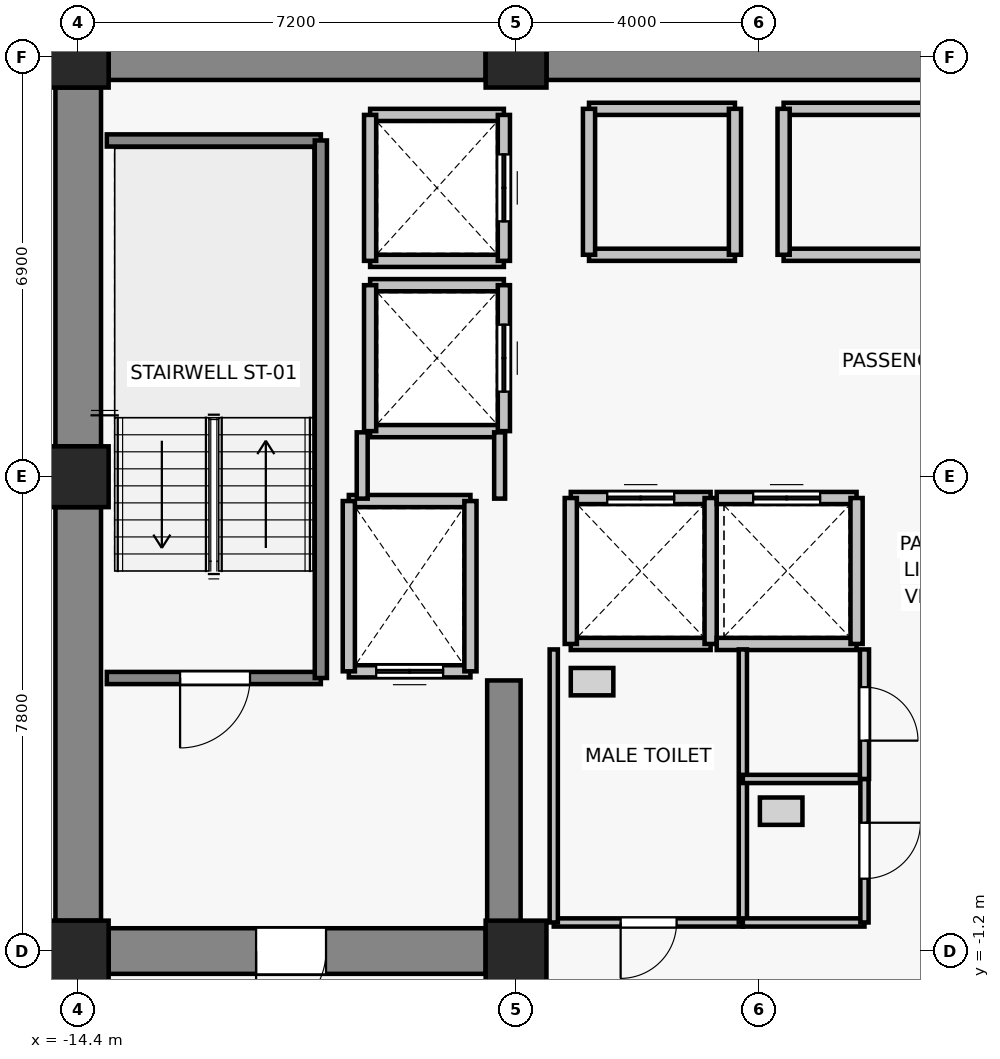
"""IFC4 building model, lengths in metres.
Left out: names, types, materials, properties, quantities, classifications, styles, units other than length and angle.
Written with IfcOpenShell. Run it as: python <this file> out.ifc"""

import sys

from ifc_helpers import new_model, si_unit, direction, frame, frame_2d, origin, origin_2d, place, context, subcontext, project, spatial, rectangle, extrude, source, transform, mapped, element, fill, save


model = new_model("IFC4")
c1 = context("Model", 3, precision=1e-05, world=origin(), true_north=direction((0.0, 1.0)))
c2 = subcontext(c1, "Body", "Model", "MODEL_VIEW")
j1 = project(units=[si_unit("LENGTHUNIT", "METRE"), si_unit("PLANEANGLEUNIT", "RADIAN")], contexts=[c1])
p1 = place(None, origin())
s1 = spatial("IfcSite", under=j1, at=p1, CompositionType="ELEMENT")
p2 = place(p1, origin())
s2 = spatial("IfcBuilding", under=s1, at=p2, CompositionType="ELEMENT")
p3 = place(p2, frame((0.0, 0.0, 86.8)))
s3 = spatial("IfcBuildingStorey", under=s2, at=p3, CompositionType="ELEMENT", Elevation=86.8)
for number, where, z_axis, x_axis in (
    (1, (-14.4, -1.2, 0.0), (0.0, 0.0, 1.0), (1.0, 0.0, 0.0)),
    (2, (-7.2, -1.2, 0.0), (0.0, 0.0, 1.0), (1.0, 0.0, 0.0)),
    (3, (-14.4, 6.6, 0.0), (0.0, 0.0, 1.0), (1.0, 0.0, 0.0)),
    (4, (-14.4, 13.5, 0.0), (0.0, 0.0, 1.0), (1.0, 0.0, 0.0)),
    (5, (-7.2, 13.5, 0.0), (0.0, 0.0, 1.0), (1.0, 0.0, 0.0)),
):
    element("IfcColumn", number, at=place(p3, frame(where, z_axis=z_axis, x_axis=x_axis)), inside=s3, PredefinedType="COLUMN", context=c2, shape_type="SweptSolid", body=[
        extrude(rectangle(XDim=1.0, YDim=1.0, at=origin_2d()), origin(), (0.0, 0.0, 1.0), 3.3),
    ])
p4 = place(p3, frame((-13.9, 13.5, 0.0), z_axis=(0.0, 0.0, 1.0), x_axis=(1.0, 0.0, 0.0)))
e6 = element("IfcWall", 6, at=p4, inside=s3, PredefinedType="SHEAR", context=c2, shape_type="SweptSolid", body=[
    extrude(rectangle(XDim=6.2, YDim=0.75, at=frame_2d((3.1, 0.0))), origin(), (0.0, 0.0, 1.0), 3.075),
])
p5 = place(p3, frame((-6.7, 13.5, 0.0), z_axis=(0.0, 0.0, 1.0), x_axis=(1.0, 0.0, 0.0)))
e7 = element("IfcWall", 7, at=p5, inside=s3, PredefinedType="SHEAR", context=c2, shape_type="SweptSolid", body=[
    extrude(rectangle(XDim=13.4, YDim=0.75, at=frame_2d((6.7, 0.0))), origin(), (0.0, 0.0, 1.0), 3.075),
])
p6 = place(p3, frame((-14.4, -0.7, 0.0), z_axis=(0.0, 0.0, 1.0), x_axis=(0.0, 1.0, 0.0)))
e8 = element("IfcWall", 8, at=p6, inside=s3, PredefinedType="SHEAR", context=c2, shape_type="SweptSolid", body=[
    extrude(rectangle(XDim=6.8, YDim=0.75, at=frame_2d((3.4, 0.0))), origin(), (0.0, 0.0, 1.0), 3.075),
])
p7 = place(p3, frame((-14.4, 7.1, 0.0), z_axis=(0.0, 0.0, 1.0), x_axis=(0.0, 1.0, 0.0)))
e9 = element("IfcWall", 9, at=p7, inside=s3, PredefinedType="SHEAR", context=c2, shape_type="SweptSolid", body=[
    extrude(rectangle(XDim=5.9, YDim=0.75, at=frame_2d((2.95, 0.0))), origin(), (0.0, 0.0, 1.0), 3.075),
])
p8 = place(p3, frame((-7.7, -1.2, 0.0), z_axis=(0.0, 0.0, 1.0), x_axis=(-1.0, 0.0, 0.0)))
e10 = element("IfcWall", 10, at=p8, inside=s3, PredefinedType="SHEAR", context=c2, shape_type="SweptSolid", body=[
    extrude(rectangle(XDim=6.2, YDim=0.75, at=frame_2d((3.1, 0.0))), origin(), (0.0, 0.0, 1.0), 3.075),
])
p9 = place(p8, frame((2.625, 0.0, 0.0)))
e11 = element("IfcOpeningElement", 11, at=p9, cuts=e10, PredefinedType="OPENING", context=c2, shape_type="SweptSolid", body=[
    extrude(rectangle(XDim=1.15, YDim=2.15, at=frame_2d((0.575, 1.075))), frame((0.0, 0.385, 0.0), z_axis=(0.0, -1.0, 0.0), x_axis=(1.0, 0.0, 0.0)), (0.0, 0.0, 1.0), 0.77),
])
p10 = place(p3, frame((-7.4, -0.825, 0.0), z_axis=(0.0, 0.0, 1.0), x_axis=(0.0, 1.0, 0.0)))
e12 = element("IfcWall", 12, at=p10, inside=s3, PredefinedType="SHEAR", context=c2, shape_type="SweptSolid", body=[
    extrude(rectangle(XDim=4.075, YDim=0.55, at=frame_2d((2.038, 0.0))), origin(), (0.0, 0.0, 1.0), 3.075),
])
p11 = place(p3, frame((-7.95, 3.4, 0.0), z_axis=(0.0, 0.0, 1.0), x_axis=(-1.0, 0.0, 0.0)))
e13 = element("IfcWall", 13, at=p11, inside=s3, PredefinedType="SOLIDWALL", context=c2, shape_type="SweptSolid", body=[
    extrude(rectangle(XDim=2.0, YDim=0.2, at=frame_2d((1.0, 0.0))), origin(), (0.0, 0.0, 1.0), 3.075),
])
p12 = place(p11, frame((0.45, 0.0, 0.0)))
e14 = element("IfcOpeningElement", 14, at=p12, cuts=e13, PredefinedType="OPENING", context=c2, shape_type="SweptSolid", body=[
    extrude(rectangle(XDim=1.1, YDim=2.2, at=frame_2d((0.55, 1.1))), frame((0.0, 0.11, 0.0), z_axis=(0.0, -1.0, 0.0), x_axis=(1.0, 0.0, 0.0)), (0.0, 0.0, 1.0), 0.22),
])
p13 = place(p3, frame((-9.95, 6.2, 0.0), z_axis=(0.0, 0.0, 1.0), x_axis=(1.0, 0.0, 0.0)))
e15 = element("IfcWall", 15, at=p13, inside=s3, PredefinedType="SOLIDWALL", context=c2, shape_type="SweptSolid", body=[
    extrude(rectangle(XDim=2.0, YDim=0.2, at=frame_2d((1.0, 0.0))), origin(), (0.0, 0.0, 1.0), 3.075),
])
for number, where, z_axis, x_axis in (
    (16, (-9.95, 3.4, 0.0), (0.0, 0.0, 1.0), (0.0, 1.0, 0.0)),
    (17, (-7.95, 6.2, 0.0), (0.0, 0.0, 1.0), (0.0, -1.0, 0.0)),
):
    element("IfcWall", number, at=place(p3, frame(where, z_axis=z_axis, x_axis=x_axis)), inside=s3, PredefinedType="SOLIDWALL", context=c2, shape_type="SweptSolid", body=[
        extrude(rectangle(XDim=2.8, YDim=0.2, at=frame_2d((1.4, 0.0))), origin(), (0.0, 0.0, 1.0), 3.075),
    ])
for number, where, z_axis, x_axis in (
    (18, (-3.6, 10.25, 0.0), (0.0, 0.0, 1.0), (-1.0, 0.0, 0.0)),
    (19, (-6.0, 12.65, 0.0), (0.0, 0.0, 1.0), (1.0, 0.0, 0.0)),
):
    element("IfcWall", number, at=place(p3, frame(where, z_axis=z_axis, x_axis=x_axis)), inside=s3, PredefinedType="SOLIDWALL", context=c2, shape_type="SweptSolid", body=[
        extrude(rectangle(XDim=2.4, YDim=0.2, at=frame_2d((1.2, 0.0))), origin(), (0.0, 0.0, 1.0), 2.59),
    ])
for number, where, z_axis, x_axis in (
    (20, (-6.0, 10.25, 0.0), (0.0, 0.0, 1.0), (0.0, 1.0, 0.0)),
    (21, (-3.6, 12.65, 0.0), (0.0, 0.0, 1.0), (0.0, -1.0, 0.0)),
):
    element("IfcWall", number, at=place(p3, frame(where, z_axis=z_axis, x_axis=x_axis)), inside=s3, PredefinedType="SOLIDWALL", context=c2, shape_type="SweptSolid", body=[
        extrude(rectangle(XDim=2.4, YDim=0.2, at=frame_2d((1.2, 0.0))), origin(), (0.0, 0.0, 1.0), 3.075),
    ])
for number, where, z_axis, x_axis in (
    (22, (-0.4, 10.25, 0.0), (0.0, 0.0, 1.0), (-1.0, 0.0, 0.0)),
    (23, (-2.8, 12.65, 0.0), (0.0, 0.0, 1.0), (1.0, 0.0, 0.0)),
):
    element("IfcWall", number, at=place(p3, frame(where, z_axis=z_axis, x_axis=x_axis)), inside=s3, PredefinedType="SOLIDWALL", context=c2, shape_type="SweptSolid", body=[
        extrude(rectangle(XDim=2.4, YDim=0.2, at=frame_2d((1.2, 0.0))), origin(), (0.0, 0.0, 1.0), 3.075),
    ])
p14 = place(p3, frame((-2.8, 10.25, 0.0), z_axis=(0.0, 0.0, 1.0), x_axis=(0.0, 1.0, 0.0)))
e24 = element("IfcWall", 24, at=p14, inside=s3, PredefinedType="SOLIDWALL", context=c2, shape_type="SweptSolid", body=[
    extrude(rectangle(XDim=2.4, YDim=0.2, at=frame_2d((1.2, 0.0))), origin(), (0.0, 0.0, 1.0), 3.075),
])
p15 = place(p3, frame((-4.0, 3.85, 0.0), z_axis=(0.0, 0.0, 1.0), x_axis=(-1.0, 0.0, 0.0)))
e25 = element("IfcWall", 25, at=p15, inside=s3, PredefinedType="SOLIDWALL", context=c2, shape_type="SweptSolid", body=[
    extrude(rectangle(XDim=2.3, YDim=0.2, at=frame_2d((1.15, 0.0))), origin(), (0.0, 0.0, 1.0), 3.075),
])
p16 = place(p3, frame((-6.3, 6.25, 0.0), z_axis=(0.0, 0.0, 1.0), x_axis=(1.0, 0.0, 0.0)))
e26 = element("IfcWall", 26, at=p16, inside=s3, PredefinedType="SOLIDWALL", context=c2, shape_type="SweptSolid", body=[
    extrude(rectangle(XDim=2.3, YDim=0.2, at=frame_2d((1.15, 0.0))), origin(), (0.0, 0.0, 1.0), 3.075),
])
p17 = place(p16, frame((0.6, 0.0, 0.0)))
e27 = element("IfcOpeningElement", 27, at=p17, cuts=e26, PredefinedType="OPENING", context=c2, shape_type="SweptSolid", body=[
    extrude(rectangle(XDim=1.1, YDim=2.2, at=frame_2d((0.55, 1.1))), frame((0.0, 0.11, 0.0), z_axis=(0.0, -1.0, 0.0), x_axis=(1.0, 0.0, 0.0)), (0.0, 0.0, 1.0), 0.22),
])
for number, where, z_axis, x_axis in (
    (28, (-6.3, 3.85, 0.0), (0.0, 0.0, 1.0), (0.0, 1.0, 0.0)),
    (29, (-4.0, 6.25, 0.0), (0.0, 0.0, 1.0), (0.0, -1.0, 0.0)),
):
    element("IfcWall", number, at=place(p3, frame(where, z_axis=z_axis, x_axis=x_axis)), inside=s3, PredefinedType="SOLIDWALL", context=c2, shape_type="SweptSolid", body=[
        extrude(rectangle(XDim=2.4, YDim=0.2, at=frame_2d((1.2, 0.0))), origin(), (0.0, 0.0, 1.0), 3.075),
    ])
p18 = place(p3, frame((-1.6, 3.85, 0.0), z_axis=(0.0, 0.0, 1.0), x_axis=(-1.0, 0.0, 0.0)))
e30 = element("IfcWall", 30, at=p18, inside=s3, PredefinedType="SOLIDWALL", context=c2, shape_type="SweptSolid", body=[
    extrude(rectangle(XDim=2.3, YDim=0.2, at=frame_2d((1.15, 0.0))), origin(), (0.0, 0.0, 1.0), 3.075),
])
p19 = place(p3, frame((-3.9, 6.25, 0.0), z_axis=(0.0, 0.0, 1.0), x_axis=(1.0, 0.0, 0.0)))
e31 = element("IfcWall", 31, at=p19, inside=s3, PredefinedType="SOLIDWALL", context=c2, shape_type="SweptSolid", body=[
    extrude(rectangle(XDim=2.3, YDim=0.2, at=frame_2d((1.15, 0.0))), origin(), (0.0, 0.0, 1.0), 3.075),
])
p20 = place(p19, frame((0.6, 0.0, 0.0)))
e32 = element("IfcOpeningElement", 32, at=p20, cuts=e31, PredefinedType="OPENING", context=c2, shape_type="SweptSolid", body=[
    extrude(rectangle(XDim=1.1, YDim=2.2, at=frame_2d((0.55, 1.1))), frame((0.0, 0.11, 0.0), z_axis=(0.0, -1.0, 0.0), x_axis=(1.0, 0.0, 0.0)), (0.0, 0.0, 1.0), 0.22),
])
p21 = place(p3, frame((-1.6, 6.25, 0.0), z_axis=(0.0, 0.0, 1.0), x_axis=(0.0, -1.0, 0.0)))
e33 = element("IfcWall", 33, at=p21, inside=s3, PredefinedType="SOLIDWALL", context=c2, shape_type="SweptSolid", body=[
    extrude(rectangle(XDim=2.4, YDim=0.2, at=frame_2d((1.2, 0.0))), origin(), (0.0, 0.0, 1.0), 3.075),
])
for number, where, z_axis, x_axis in (
    (34, (-7.4, 7.35, 0.0), (0.0, 0.0, 1.0), (-1.0, 0.0, 0.0)),
    (35, (-9.6, 9.75, 0.0), (0.0, 0.0, 1.0), (1.0, 0.0, 0.0)),
):
    element("IfcWall", number, at=place(p3, frame(where, z_axis=z_axis, x_axis=x_axis)), inside=s3, PredefinedType="SOLIDWALL", context=c2, shape_type="SweptSolid", body=[
        extrude(rectangle(XDim=2.2, YDim=0.2, at=frame_2d((1.1, 0.0))), origin(), (0.0, 0.0, 1.0), 2.515),
    ])
p22 = place(p3, frame((-9.6, 7.35, 0.0), z_axis=(0.0, 0.0, 1.0), x_axis=(0.0, 1.0, 0.0)))
e36 = element("IfcWall", 36, at=p22, inside=s3, PredefinedType="SOLIDWALL", context=c2, shape_type="SweptSolid", body=[
    extrude(rectangle(XDim=2.4, YDim=0.2, at=frame_2d((1.2, 0.0))), origin(), (0.0, 0.0, 1.0), 3.075),
])
p23 = place(p3, frame((-7.4, 9.75, 0.0), z_axis=(0.0, 0.0, 1.0), x_axis=(0.0, -1.0, 0.0)))
e37 = element("IfcWall", 37, at=p23, inside=s3, PredefinedType="SOLIDWALL", context=c2, shape_type="SweptSolid", body=[
    extrude(rectangle(XDim=2.4, YDim=0.2, at=frame_2d((1.2, 0.0))), origin(), (0.0, 0.0, 1.0), 2.515),
])
p24 = place(p23, frame((0.65, 0.0, 0.0)))
e38 = element("IfcOpeningElement", 38, at=p24, cuts=e37, PredefinedType="OPENING", context=c2, shape_type="SweptSolid", body=[
    extrude(rectangle(XDim=1.1, YDim=2.2, at=frame_2d((0.55, 1.1))), frame((0.0, 0.11, 0.0), z_axis=(0.0, -1.0, 0.0), x_axis=(1.0, 0.0, 0.0)), (0.0, 0.0, 1.0), 0.22),
])
for number, where, z_axis, x_axis in (
    (39, (-7.4, 10.15, 0.0), (0.0, 0.0, 1.0), (-1.0, 0.0, 0.0)),
    (40, (-9.6, 12.55, 0.0), (0.0, 0.0, 1.0), (1.0, 0.0, 0.0)),
):
    element("IfcWall", number, at=place(p3, frame(where, z_axis=z_axis, x_axis=x_axis)), inside=s3, PredefinedType="SOLIDWALL", context=c2, shape_type="SweptSolid", body=[
        extrude(rectangle(XDim=2.2, YDim=0.2, at=frame_2d((1.1, 0.0))), origin(), (0.0, 0.0, 1.0), 2.515),
    ])
p25 = place(p3, frame((-9.6, 10.15, 0.0), z_axis=(0.0, 0.0, 1.0), x_axis=(0.0, 1.0, 0.0)))
e41 = element("IfcWall", 41, at=p25, inside=s3, PredefinedType="SOLIDWALL", context=c2, shape_type="SweptSolid", body=[
    extrude(rectangle(XDim=2.4, YDim=0.2, at=frame_2d((1.2, 0.0))), origin(), (0.0, 0.0, 1.0), 3.075),
])
p26 = place(p3, frame((-7.4, 12.55, 0.0), z_axis=(0.0, 0.0, 1.0), x_axis=(0.0, -1.0, 0.0)))
e42 = element("IfcWall", 42, at=p26, inside=s3, PredefinedType="SOLIDWALL", context=c2, shape_type="SweptSolid", body=[
    extrude(rectangle(XDim=2.4, YDim=0.2, at=frame_2d((1.2, 0.0))), origin(), (0.0, 0.0, 1.0), 2.515),
])
p27 = place(p26, frame((0.65, 0.0, 0.0)))
e43 = element("IfcOpeningElement", 43, at=p27, cuts=e42, PredefinedType="OPENING", context=c2, shape_type="SweptSolid", body=[
    extrude(rectangle(XDim=1.1, YDim=2.2, at=frame_2d((0.55, 1.1))), frame((0.0, 0.11, 0.0), z_axis=(0.0, -1.0, 0.0), x_axis=(1.0, 0.0, 0.0)), (0.0, 0.0, 1.0), 0.22),
])
p28 = place(p3, frame((-10.41, 3.29, 0.0), z_axis=(0.0, 0.0, 1.0), x_axis=(-1.0, 0.0, 0.0)))
e44 = element("IfcWall", 44, at=p28, inside=s3, PredefinedType="SOLIDWALL", context=c2, shape_type="SweptSolid", body=[
    extrude(rectangle(XDim=3.52, YDim=0.2, at=frame_2d((1.76, 0.0))), origin(), (0.0, 0.0, 1.0), 3.075),
])
p29 = place(p28, frame((1.165, 0.0, 0.0)))
e45 = element("IfcOpeningElement", 45, at=p29, cuts=e44, PredefinedType="OPENING", context=c2, shape_type="SweptSolid", body=[
    extrude(rectangle(XDim=1.15, YDim=2.15, at=frame_2d((0.575, 1.075))), frame((0.0, 0.11, 0.0), z_axis=(0.0, -1.0, 0.0), x_axis=(1.0, 0.0, 0.0)), (0.0, 0.0, 1.0), 0.22),
])
p30 = place(p3, frame((-13.93, 12.13, 0.0), z_axis=(0.0, 0.0, 1.0), x_axis=(1.0, 0.0, 0.0)))
e46 = element("IfcWall", 46, at=p30, inside=s3, PredefinedType="SOLIDWALL", context=c2, shape_type="SweptSolid", body=[
    extrude(rectangle(XDim=3.52, YDim=0.2, at=frame_2d((1.76, 0.0))), origin(), (0.0, 0.0, 1.0), 3.075),
])
p31 = place(p3, frame((-10.41, 12.13, 0.0), z_axis=(0.0, 0.0, 1.0), x_axis=(0.0, -1.0, 0.0)))
e47 = element("IfcWall", 47, at=p31, inside=s3, PredefinedType="SOLIDWALL", context=c2, shape_type="SweptSolid", body=[
    extrude(rectangle(XDim=8.84, YDim=0.2, at=frame_2d((4.42, 0.0))), origin(), (0.0, 0.0, 1.0), 3.075),
])
p32 = place(p3, frame((-9.73, 6.24, 0.0), z_axis=(0.0, 0.0, 1.0), x_axis=(0.0, 1.0, 0.0)))
e48 = element("IfcWall", 48, at=p32, inside=s3, PredefinedType="PARTITIONING", context=c2, shape_type="SweptSolid", body=[
    extrude(rectangle(XDim=1.09, YDim=0.18, at=frame_2d((0.545, 0.0))), origin(), (0.0, 0.0, 1.0), 3.075),
])
p33 = place(p3, frame((-7.47, 7.33, 0.0), z_axis=(0.0, 0.0, 1.0), x_axis=(0.0, -1.0, 0.0)))
e49 = element("IfcWall", 49, at=p33, inside=s3, PredefinedType="PARTITIONING", context=c2, shape_type="SweptSolid", body=[
    extrude(rectangle(XDim=1.09, YDim=0.18, at=frame_2d((0.545, 0.0))), origin(), (0.0, 0.0, 1.0), 2.515),
])
p34 = place(p3, frame((-3.47, -0.73, 0.0), z_axis=(0.0, 0.0, 1.0), x_axis=(-1.0, 0.0, 0.0)))
e50 = element("IfcWall", 50, at=p34, inside=s3, PredefinedType="PARTITIONING", context=c2, shape_type="SweptSolid", body=[
    extrude(rectangle(XDim=3.11, YDim=0.135, at=frame_2d((1.555, 0.0))), origin(), (0.0, 0.0, 1.0), 3.075),
])
p35 = place(p34, frame((1.09, 0.0, 0.0)))
e51 = element("IfcOpeningElement", 51, at=p35, cuts=e50, PredefinedType="OPENING", context=c2, shape_type="SweptSolid", body=[
    extrude(rectangle(XDim=0.92, YDim=2.1, at=frame_2d((0.46, 1.05))), frame((0.0, 0.077, 0.0), z_axis=(0.0, -1.0, 0.0), x_axis=(1.0, 0.0, 0.0)), (0.0, 0.0, 1.0), 0.155),
])
for number, where, z_axis, x_axis in (
    (52, (-6.58, -0.73, 0.0), (0.0, 0.0, 1.0), (0.0, 1.0, 0.0)),
    (53, (-3.47, 3.76, 0.0), (0.0, 0.0, 1.0), (0.0, -1.0, 0.0)),
):
    element("IfcWall", number, at=place(p3, frame(where, z_axis=z_axis, x_axis=x_axis)), inside=s3, PredefinedType="PARTITIONING", context=c2, shape_type="SweptSolid", body=[
        extrude(rectangle(XDim=4.49, YDim=0.135, at=frame_2d((2.245, 0.0))), origin(), (0.0, 0.0, 1.0), 3.075),
    ])
for number, where, z_axis, x_axis in (
    (54, (-1.47, -0.73, 0.0), (0.0, 0.0, 1.0), (-1.0, 0.0, 0.0)),
    (55, (-3.47, 1.63, 0.0), (0.0, 0.0, 1.0), (1.0, 0.0, 0.0)),
):
    element("IfcWall", number, at=place(p3, frame(where, z_axis=z_axis, x_axis=x_axis)), inside=s3, PredefinedType="PARTITIONING", context=c2, shape_type="SweptSolid", body=[
        extrude(rectangle(XDim=2.0, YDim=0.135, at=frame_2d((1.0, 0.0))), origin(), (0.0, 0.0, 1.0), 3.075),
    ])
p36 = place(p3, frame((-1.47, 1.63, 0.0), z_axis=(0.0, 0.0, 1.0), x_axis=(0.0, -1.0, 0.0)))
e56 = element("IfcWall", 56, at=p36, inside=s3, PredefinedType="PARTITIONING", context=c2, shape_type="SweptSolid", body=[
    extrude(rectangle(XDim=2.36, YDim=0.135, at=frame_2d((1.18, 0.0))), origin(), (0.0, 0.0, 1.0), 3.075),
])
p37 = place(p36, frame((0.72, 0.0, 0.0)))
e57 = element("IfcOpeningElement", 57, at=p37, cuts=e56, PredefinedType="OPENING", context=c2, shape_type="SweptSolid", body=[
    extrude(rectangle(XDim=0.92, YDim=2.1, at=frame_2d((0.46, 1.05))), frame((0.0, 0.077, 0.0), z_axis=(0.0, -1.0, 0.0), x_axis=(1.0, 0.0, 0.0)), (0.0, 0.0, 1.0), 0.155),
])
p38 = place(p3, frame((-1.47, 3.76, 0.0), z_axis=(0.0, 0.0, 1.0), x_axis=(0.0, -1.0, 0.0)))
e58 = element("IfcWall", 58, at=p38, inside=s3, PredefinedType="PARTITIONING", context=c2, shape_type="SweptSolid", body=[
    extrude(rectangle(XDim=2.13, YDim=0.15, at=frame_2d((1.065, 0.0))), origin(), (0.0, 0.0, 1.0), 3.075),
])
p39 = place(p38, frame((0.62, 0.0, 0.0)))
e59 = element("IfcOpeningElement", 59, at=p39, cuts=e58, PredefinedType="OPENING", context=c2, shape_type="SweptSolid", body=[
    extrude(rectangle(XDim=0.88, YDim=2.1, at=frame_2d((0.44, 1.05))), frame((0.0, 0.085, 0.0), z_axis=(0.0, -1.0, 0.0), x_axis=(1.0, 0.0, 0.0)), (0.0, 0.0, 1.0), 0.17),
])
m1 = source(origin(), c2, "Body", "SweptSolid", [
    extrude(rectangle(XDim=1.1, YDim=2.2, at=frame_2d((0.55, 1.1))), frame((0.0, 0.025, 0.0), z_axis=(0.0, -1.0, 0.0), x_axis=(1.0, 0.0, 0.0)), (0.0, 0.0, 1.0), 0.05),
])
p40 = place(p12, origin())
e60 = element("IfcDoor", 60, at=p40, inside=s3, OperationType="DOUBLE_DOOR_SLIDING", PredefinedType="DOOR", context=c2, shape_type="MappedRepresentation", body=[
    mapped(m1, transform((0.0, 0.0, 0.0), x_axis=(1.0, 0.0, 0.0), y_axis=(0.0, 1.0, 0.0), z_axis=(0.0, 0.0, 1.0), scale=1.0)),
])
fill(e14, e60)
p41 = place(p17, origin())
e61 = element("IfcDoor", 61, at=p41, inside=s3, OperationType="DOUBLE_DOOR_SLIDING", PredefinedType="DOOR", context=c2, shape_type="MappedRepresentation", body=[
    mapped(m1, transform((0.0, 0.0, 0.0), x_axis=(1.0, 0.0, 0.0), y_axis=(0.0, 1.0, 0.0), z_axis=(0.0, 0.0, 1.0), scale=1.0)),
])
fill(e27, e61)
p42 = place(p20, origin())
e62 = element("IfcDoor", 62, at=p42, inside=s3, OperationType="DOUBLE_DOOR_SLIDING", PredefinedType="DOOR", context=c2, shape_type="MappedRepresentation", body=[
    mapped(m1, transform((0.0, 0.0, 0.0), x_axis=(1.0, 0.0, 0.0), y_axis=(0.0, 1.0, 0.0), z_axis=(0.0, 0.0, 1.0), scale=1.0)),
])
fill(e32, e62)
p43 = place(p24, origin())
e63 = element("IfcDoor", 63, at=p43, inside=s3, OperationType="DOUBLE_DOOR_SLIDING", PredefinedType="DOOR", context=c2, shape_type="MappedRepresentation", body=[
    mapped(m1, transform((0.0, 0.0, 0.0), x_axis=(1.0, 0.0, 0.0), y_axis=(0.0, 1.0, 0.0), z_axis=(0.0, 0.0, 1.0), scale=1.0)),
])
fill(e38, e63)
p44 = place(p27, origin())
e64 = element("IfcDoor", 64, at=p44, inside=s3, OperationType="DOUBLE_DOOR_SLIDING", PredefinedType="DOOR", context=c2, shape_type="MappedRepresentation", body=[
    mapped(m1, transform((0.0, 0.0, 0.0), x_axis=(1.0, 0.0, 0.0), y_axis=(0.0, 1.0, 0.0), z_axis=(0.0, 0.0, 1.0), scale=1.0)),
])
fill(e43, e64)
m2 = source(origin(), c2, "Body", "SweptSolid", [
    extrude(rectangle(XDim=1.15, YDim=2.15, at=frame_2d((0.575, 1.075))), frame((0.0, 0.025, 0.0), z_axis=(0.0, -1.0, 0.0), x_axis=(1.0, 0.0, 0.0)), (0.0, 0.0, 1.0), 0.05),
])
p45 = place(p29, origin())
e65 = element("IfcDoor", 65, at=p45, inside=s3, OperationType="SINGLE_SWING_RIGHT", PredefinedType="DOOR", context=c2, shape_type="MappedRepresentation", body=[
    mapped(m2, transform((0.0, 0.0, 0.0), x_axis=(1.0, 0.0, 0.0), y_axis=(0.0, 1.0, 0.0), z_axis=(0.0, 0.0, 1.0), scale=1.0)),
])
fill(e45, e65)
p46 = place(p9, origin())
e66 = element("IfcDoor", 66, at=p46, inside=s3, OperationType="SINGLE_SWING_RIGHT", PredefinedType="DOOR", context=c2, shape_type="MappedRepresentation", body=[
    mapped(m2, transform((0.0, 0.0, 0.0), x_axis=(1.0, 0.0, 0.0), y_axis=(0.0, 1.0, 0.0), z_axis=(0.0, 0.0, 1.0), scale=1.0)),
])
fill(e11, e66)
m3 = source(origin(), c2, "Body", "SweptSolid", [
    extrude(rectangle(XDim=0.92, YDim=2.1, at=frame_2d((0.46, 1.05))), frame((0.0, 0.025, 0.0), z_axis=(0.0, -1.0, 0.0), x_axis=(1.0, 0.0, 0.0)), (0.0, 0.0, 1.0), 0.05),
])
p47 = place(p35, origin())
e67 = element("IfcDoor", 67, at=p47, inside=s3, OperationType="SINGLE_SWING_RIGHT", PredefinedType="DOOR", context=c2, shape_type="MappedRepresentation", body=[
    mapped(m3, transform((0.0, 0.0, 0.0), x_axis=(1.0, 0.0, 0.0), y_axis=(0.0, 1.0, 0.0), z_axis=(0.0, 0.0, 1.0), scale=1.0)),
])
fill(e51, e67)
p48 = place(p37, origin())
e68 = element("IfcDoor", 68, at=p48, inside=s3, OperationType="SINGLE_SWING_LEFT", PredefinedType="DOOR", context=c2, shape_type="MappedRepresentation", body=[
    mapped(m3, transform((0.0, 0.0, 0.0), x_axis=(1.0, 0.0, 0.0), y_axis=(0.0, 1.0, 0.0), z_axis=(0.0, 0.0, 1.0), scale=1.0)),
])
fill(e57, e68)
m4 = source(origin(), c2, "Body", "SweptSolid", [
    extrude(rectangle(XDim=0.88, YDim=2.1, at=frame_2d((0.44, 1.05))), frame((0.0, 0.025, 0.0), z_axis=(0.0, -1.0, 0.0), x_axis=(1.0, 0.0, 0.0)), (0.0, 0.0, 1.0), 0.05),
])
p49 = place(p39, origin())
e69 = element("IfcDoor", 69, at=p49, inside=s3, OperationType="SINGLE_SWING_RIGHT", PredefinedType="DOOR", context=c2, shape_type="MappedRepresentation", body=[
    mapped(m4, transform((0.0, 0.0, 0.0), x_axis=(1.0, 0.0, 0.0), y_axis=(0.0, 1.0, 0.0), z_axis=(0.0, 0.0, 1.0), scale=1.0)),
])
fill(e59, e69)
save(model, sys.argv[1])
